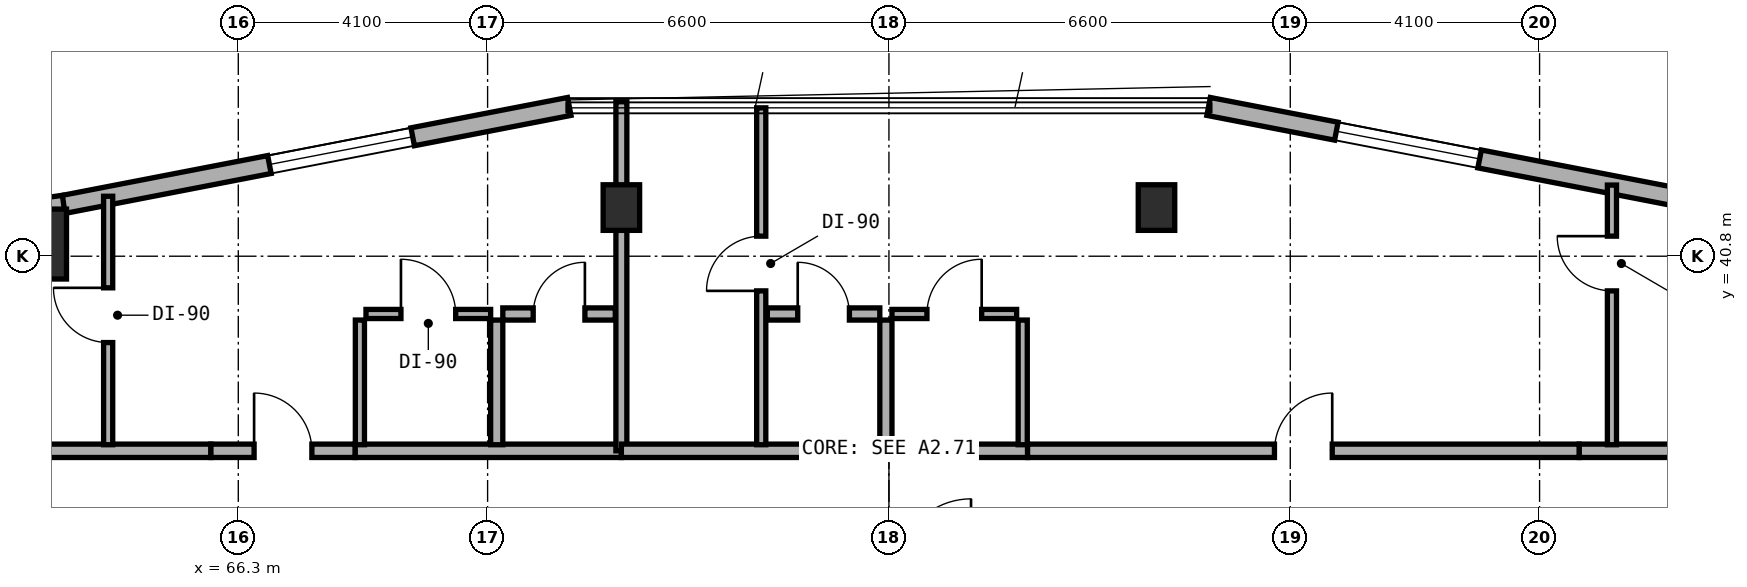
"""IFC4 building model, lengths in metres.
Left out: names, types, materials, properties, quantities, classifications, styles, units other than length and angle.
Written with IfcOpenShell. Run it as: python <this file> out.ifc"""

import sys

from ifc_helpers import new_model, si_unit, direction, frame, frame_2d, origin, origin_2d, place, context, subcontext, project, spatial, rectangle, extrude, element, fill, save


model = new_model("IFC4")
c1 = context("Model", 3, precision=1e-05, world=origin(), true_north=direction((0.0, 1.0)))
c2 = subcontext(c1, "Body", "Model", "MODEL_VIEW")
j1 = project(units=[si_unit("LENGTHUNIT", "METRE"), si_unit("PLANEANGLEUNIT", "RADIAN")], contexts=[c1])
p1 = place(None, origin())
s1 = spatial("IfcSite", under=j1, at=p1, CompositionType="ELEMENT")
p2 = place(p1, origin())
s2 = spatial("IfcBuilding", under=s1, at=p2, CompositionType="ELEMENT")
p3 = place(p2, frame((0.0, 0.0, 83.5)))
s3 = spatial("IfcBuildingStorey", under=s2, at=p3, CompositionType="ELEMENT", Elevation=83.5)
for number, where, z_axis, x_axis in (
    (1, (72.6, 41.6, 0.0), (0.0, 0.0, 1.0), (1.0, 0.0, 0.0)),
    (2, (81.4, 41.6, 0.0), (0.0, 0.0, 1.0), (1.0, 0.0, 0.0)),
):
    element("IfcColumn", number, at=place(p3, frame(where, z_axis=z_axis, x_axis=x_axis)), inside=s3, PredefinedType="COLUMN", context=c2, shape_type="SweptSolid", body=[
        extrude(rectangle(XDim=0.6, YDim=0.75, at=origin_2d()), origin(), (0.0, 0.0, 1.0), 3.5),
    ])
p4 = place(p3, frame((63.0, 41.0, 0.0), z_axis=(0.0, 0.0, 1.0), x_axis=(1.0, 0.0, 0.0)))
e3 = element("IfcColumn", 3, at=p4, inside=s3, PredefinedType="COLUMN", context=c2, shape_type="SweptSolid", body=[
    extrude(rectangle(XDim=0.95, YDim=1.15, at=origin_2d()), origin(), (0.0, 0.0, 1.0), 3.5),
])
p5 = place(p3, frame((90.579, 41.651, 0.0), z_axis=(0.0, 0.0, 1.0), x_axis=(-0.981750199588, 0.190175039396, 0.0)))
e4 = element("IfcWall", 4, at=p5, inside=s3, PredefinedType="STANDARD", context=c2, shape_type="SweptSolid", body=[
    extrude(rectangle(XDim=8.477, YDim=0.3, at=frame_2d((4.238, 0.0))), origin(), (0.0, 0.0, 1.0), 3.25),
])
p6 = place(p5, frame((3.937, 0.0, 0.8)))
e5 = element("IfcOpeningElement", 5, at=p6, cuts=e4, PredefinedType="OPENING", context=c2, shape_type="SweptSolid", body=[
    extrude(rectangle(XDim=2.4, YDim=1.6, at=frame_2d((1.2, 0.8))), frame((0.0, 0.16, 0.0), z_axis=(0.0, -1.0, 0.0), x_axis=(1.0, 0.0, 0.0)), (0.0, 0.0, 1.0), 0.32),
])
p7 = place(p3, frame((71.743, 43.263, 0.0), z_axis=(0.0, 0.0, 1.0), x_axis=(-0.981750199588, -0.190175039396, 0.0)))
e6 = element("IfcWall", 6, at=p7, inside=s3, PredefinedType="STANDARD", context=c2, shape_type="SweptSolid", body=[
    extrude(rectangle(XDim=8.477, YDim=0.3, at=frame_2d((4.238, 0.0))), origin(), (0.0, 0.0, 1.0), 3.25),
])
p8 = place(p7, frame((2.623, 0.0, 0.8)))
e7 = element("IfcOpeningElement", 7, at=p8, cuts=e6, PredefinedType="OPENING", context=c2, shape_type="SweptSolid", body=[
    extrude(rectangle(XDim=2.4, YDim=1.6, at=frame_2d((1.2, 0.8))), frame((0.0, 0.16, 0.0), z_axis=(0.0, -1.0, 0.0), x_axis=(1.0, 0.0, 0.0)), (0.0, 0.0, 1.0), 0.32),
])
p9 = place(p3, frame((63.428, 41.652, 0.0), z_axis=(0.0, 0.0, 1.0), x_axis=(-0.991293937098, -0.131667498923, 0.0)))
e8 = element("IfcWall", 8, at=p9, inside=s3, PredefinedType="STANDARD", context=c2, shape_type="SweptSolid", body=[
    extrude(rectangle(XDim=0.677, YDim=0.3, at=frame_2d((0.338, 0.0))), origin(), (0.0, 0.0, 1.0), 3.25),
])
p10 = place(p3, frame((59.36, 37.6, 0.0), z_axis=(0.0, 0.0, 1.0), x_axis=(1.0, 0.0, 0.0)))
e9 = element("IfcWall", 9, at=p10, inside=s3, PredefinedType="SOLIDWALL", context=c2, shape_type="SweptSolid", body=[
    extrude(rectangle(XDim=6.49, YDim=0.22, at=frame_2d((3.245, 0.0))), origin(), (0.0, 0.0, 1.0), 2.945),
])
p11 = place(p3, frame((68.22, 37.6, 0.0), z_axis=(0.0, 0.0, 1.0), x_axis=(1.0, 0.0, 0.0)))
e10 = element("IfcWall", 10, at=p11, inside=s3, PredefinedType="SOLIDWALL", context=c2, shape_type="SweptSolid", body=[
    extrude(rectangle(XDim=4.38, YDim=0.22, at=frame_2d((2.19, 0.0))), origin(), (0.0, 0.0, 1.0), 2.825),
])
p12 = place(p3, frame((65.85, 37.6, 0.0), z_axis=(0.0, 0.0, 1.0), x_axis=(1.0, 0.0, 0.0)))
e11 = element("IfcWall", 11, at=p12, inside=s3, PredefinedType="SOLIDWALL", context=c2, shape_type="SweptSolid", body=[
    extrude(rectangle(XDim=2.37, YDim=0.22, at=frame_2d((1.185, 0.0))), origin(), (0.0, 0.0, 1.0), 3.22),
])
p13 = place(p12, frame((0.71, 0.0, 0.0)))
e12 = element("IfcOpeningElement", 12, at=p13, cuts=e11, PredefinedType="OPENING", context=c2, shape_type="SweptSolid", body=[
    extrude(rectangle(XDim=0.95, YDim=2.1, at=frame_2d((0.475, 1.05))), frame((0.0, 0.12, 0.0), z_axis=(0.0, -1.0, 0.0), x_axis=(1.0, 0.0, 0.0)), (0.0, 0.0, 1.0), 0.24),
])
p14 = place(p3, frame((64.16, 37.7, 0.0), z_axis=(0.0, 0.0, 1.0), x_axis=(0.0, 1.0, 0.0)))
e13 = element("IfcWall", 13, at=p14, inside=s3, PredefinedType="PARTITIONING", context=c2, shape_type="SweptSolid", body=[
    extrude(rectangle(XDim=4.086, YDim=0.15, at=frame_2d((2.043, 0.0))), origin(), (0.0, 0.0, 1.0), 2.945),
])
p15 = place(p14, frame((1.68, 0.0, 0.0)))
e14 = element("IfcOpeningElement", 14, at=p15, cuts=e13, PredefinedType="OPENING", context=c2, shape_type="SweptSolid", body=[
    extrude(rectangle(XDim=0.9, YDim=2.1, at=frame_2d((0.45, 1.05))), frame((0.0, 0.085, 0.0), z_axis=(0.0, -1.0, 0.0), x_axis=(1.0, 0.0, 0.0)), (0.0, 0.0, 1.0), 0.17),
])
p16 = place(p3, frame((70.55, 37.7, 0.0), z_axis=(0.0, 0.0, 1.0), x_axis=(0.0, 1.0, 0.0)))
e15 = element("IfcWall", 15, at=p16, inside=s3, PredefinedType="PLUMBINGWALL", context=c2, shape_type="SweptSolid", body=[
    extrude(rectangle(XDim=2.05, YDim=0.2, at=frame_2d((1.025, 0.0))), origin(), (0.0, 0.0, 1.0), 3.22),
])
p17 = place(p3, frame((68.3, 37.7, 0.0), z_axis=(0.0, 0.0, 1.0), x_axis=(0.0, 1.0, 0.0)))
e16 = element("IfcWall", 16, at=p17, inside=s3, PredefinedType="PARTITIONING", context=c2, shape_type="SweptSolid", body=[
    extrude(rectangle(XDim=2.05, YDim=0.15, at=frame_2d((1.025, 0.0))), origin(), (0.0, 0.0, 1.0), 3.22),
])
p18 = place(p3, frame((70.65, 39.85, 0.0), z_axis=(0.0, 0.0, 1.0), x_axis=(1.0, 0.0, 0.0)))
e17 = element("IfcWall", 17, at=p18, inside=s3, PredefinedType="PLUMBINGWALL", context=c2, shape_type="SweptSolid", body=[
    extrude(rectangle(XDim=1.85, YDim=0.2, at=frame_2d((0.925, 0.0))), origin(), (0.0, 0.0, 1.0), 3.22),
])
p19 = place(p18, frame((0.5, 0.0, 0.0)))
e18 = element("IfcOpeningElement", 18, at=p19, cuts=e17, PredefinedType="OPENING", context=c2, shape_type="SweptSolid", body=[
    extrude(rectangle(XDim=0.85, YDim=2.1, at=frame_2d((0.425, 1.05))), frame((0.0, 0.11, 0.0), z_axis=(0.0, -1.0, 0.0), x_axis=(1.0, 0.0, 0.0)), (0.0, 0.0, 1.0), 0.22),
])
p20 = place(p3, frame((68.4, 39.85, 0.0), z_axis=(0.0, 0.0, 1.0), x_axis=(1.0, 0.0, 0.0)))
e19 = element("IfcWall", 19, at=p20, inside=s3, PredefinedType="PARTITIONING", context=c2, shape_type="SweptSolid", body=[
    extrude(rectangle(XDim=2.05, YDim=0.15, at=frame_2d((1.025, 0.0))), origin(), (0.0, 0.0, 1.0), 3.22),
])
p21 = place(p20, frame((0.575, 0.0, 0.0)))
e20 = element("IfcOpeningElement", 20, at=p21, cuts=e19, PredefinedType="OPENING", context=c2, shape_type="SweptSolid", body=[
    extrude(rectangle(XDim=0.9, YDim=2.1, at=frame_2d((0.45, 1.05))), frame((0.0, 0.085, 0.0), z_axis=(0.0, -1.0, 0.0), x_axis=(1.0, 0.0, 0.0)), (0.0, 0.0, 1.0), 0.17),
])
p22 = place(p3, frame((72.6, 37.6, 0.0), z_axis=(0.0, 0.0, 1.0), x_axis=(0.0, 1.0, 0.0)))
e21 = element("IfcWall", 21, at=p22, inside=s3, PredefinedType="SOLIDWALL", context=c2, shape_type="SweptSolid", body=[
    extrude(rectangle(XDim=5.74, YDim=0.18, at=frame_2d((2.87, 0.0))), origin(), (0.0, 0.0, 1.0), 2.825),
])
p23 = place(p3, frame((72.6, 37.6, 0.0), z_axis=(0.0, 0.0, 1.0), x_axis=(1.0, 0.0, 0.0)))
e22 = element("IfcWall", 22, at=p23, inside=s3, PredefinedType="SOLIDWALL", context=c2, shape_type="SweptSolid", body=[
    extrude(rectangle(XDim=6.68, YDim=0.22, at=frame_2d((3.34, 0.0))), origin(), (0.0, 0.0, 1.0), 2.825),
])
p24 = place(p3, frame((88.35, 37.6, 0.0), z_axis=(0.0, 0.0, 1.0), x_axis=(1.0, 0.0, 0.0)))
e23 = element("IfcWall", 23, at=p24, inside=s3, PredefinedType="SOLIDWALL", context=c2, shape_type="SweptSolid", body=[
    extrude(rectangle(XDim=6.29, YDim=0.22, at=frame_2d((3.145, 0.0))), origin(), (0.0, 0.0, 1.0), 2.945),
])
p25 = place(p3, frame((79.28, 37.6, 0.0), z_axis=(0.0, 0.0, 1.0), x_axis=(1.0, 0.0, 0.0)))
e24 = element("IfcWall", 24, at=p25, inside=s3, PredefinedType="SOLIDWALL", context=c2, shape_type="SweptSolid", body=[
    extrude(rectangle(XDim=9.07, YDim=0.22, at=frame_2d((4.535, 0.0))), origin(), (0.0, 0.0, 1.0), 2.825),
])
p26 = place(p25, frame((4.06, 0.0, 0.0)))
e25 = element("IfcOpeningElement", 25, at=p26, cuts=e24, PredefinedType="OPENING", context=c2, shape_type="SweptSolid", body=[
    extrude(rectangle(XDim=0.95, YDim=2.1, at=frame_2d((0.475, 1.05))), frame((0.0, 0.12, 0.0), z_axis=(0.0, -1.0, 0.0), x_axis=(1.0, 0.0, 0.0)), (0.0, 0.0, 1.0), 0.24),
])
p27 = place(p3, frame((74.9, 37.7, 0.0), z_axis=(0.0, 0.0, 1.0), x_axis=(0.0, 1.0, 0.0)))
e26 = element("IfcWall", 26, at=p27, inside=s3, PredefinedType="PARTITIONING", context=c2, shape_type="SweptSolid", body=[
    extrude(rectangle(XDim=5.54, YDim=0.15, at=frame_2d((2.77, 0.0))), origin(), (0.0, 0.0, 1.0), 2.865),
])
p28 = place(p27, frame((2.53, 0.0, 0.0)))
e27 = element("IfcOpeningElement", 27, at=p28, cuts=e26, PredefinedType="OPENING", context=c2, shape_type="SweptSolid", body=[
    extrude(rectangle(XDim=0.9, YDim=2.1, at=frame_2d((0.45, 1.05))), frame((0.0, 0.085, 0.0), z_axis=(0.0, -1.0, 0.0), x_axis=(1.0, 0.0, 0.0)), (0.0, 0.0, 1.0), 0.17),
])
p29 = place(p3, frame((88.89, 37.7, 0.0), z_axis=(0.0, 0.0, 1.0), x_axis=(0.0, 1.0, 0.0)))
e28 = element("IfcWall", 28, at=p29, inside=s3, PredefinedType="PARTITIONING", context=c2, shape_type="SweptSolid", body=[
    extrude(rectangle(XDim=4.27, YDim=0.15, at=frame_2d((2.135, 0.0))), origin(), (0.0, 0.0, 1.0), 2.945),
])
p30 = place(p29, frame((2.53, 0.0, 0.0)))
e29 = element("IfcOpeningElement", 29, at=p30, cuts=e28, PredefinedType="OPENING", context=c2, shape_type="SweptSolid", body=[
    extrude(rectangle(XDim=0.9, YDim=2.1, at=frame_2d((0.45, 1.05))), frame((0.0, 0.085, 0.0), z_axis=(0.0, -1.0, 0.0), x_axis=(1.0, 0.0, 0.0)), (0.0, 0.0, 1.0), 0.17),
])
p31 = place(p3, frame((76.95, 37.7, 0.0), z_axis=(0.0, 0.0, 1.0), x_axis=(0.0, 1.0, 0.0)))
e30 = element("IfcWall", 30, at=p31, inside=s3, PredefinedType="PLUMBINGWALL", context=c2, shape_type="SweptSolid", body=[
    extrude(rectangle(XDim=2.05, YDim=0.2, at=frame_2d((1.025, 0.0))), origin(), (0.0, 0.0, 1.0), 2.865),
])
p32 = place(p3, frame((79.2, 37.7, 0.0), z_axis=(0.0, 0.0, 1.0), x_axis=(0.0, 1.0, 0.0)))
e31 = element("IfcWall", 31, at=p32, inside=s3, PredefinedType="PARTITIONING", context=c2, shape_type="SweptSolid", body=[
    extrude(rectangle(XDim=2.05, YDim=0.15, at=frame_2d((1.025, 0.0))), origin(), (0.0, 0.0, 1.0), 2.865),
])
p33 = place(p3, frame((75.0, 39.85, 0.0), z_axis=(0.0, 0.0, 1.0), x_axis=(1.0, 0.0, 0.0)))
e32 = element("IfcWall", 32, at=p33, inside=s3, PredefinedType="PLUMBINGWALL", context=c2, shape_type="SweptSolid", body=[
    extrude(rectangle(XDim=1.85, YDim=0.2, at=frame_2d((0.925, 0.0))), origin(), (0.0, 0.0, 1.0), 3.22),
])
p34 = place(p33, frame((0.5, 0.0, 0.0)))
e33 = element("IfcOpeningElement", 33, at=p34, cuts=e32, PredefinedType="OPENING", context=c2, shape_type="SweptSolid", body=[
    extrude(rectangle(XDim=0.85, YDim=2.1, at=frame_2d((0.425, 1.05))), frame((0.0, 0.11, 0.0), z_axis=(0.0, -1.0, 0.0), x_axis=(1.0, 0.0, 0.0)), (0.0, 0.0, 1.0), 0.22),
])
p35 = place(p3, frame((77.05, 39.85, 0.0), z_axis=(0.0, 0.0, 1.0), x_axis=(1.0, 0.0, 0.0)))
e34 = element("IfcWall", 34, at=p35, inside=s3, PredefinedType="PARTITIONING", context=c2, shape_type="SweptSolid", body=[
    extrude(rectangle(XDim=2.05, YDim=0.15, at=frame_2d((1.025, 0.0))), origin(), (0.0, 0.0, 1.0), 3.22),
])
p36 = place(p35, frame((0.575, 0.0, 0.0)))
e35 = element("IfcOpeningElement", 35, at=p36, cuts=e34, PredefinedType="OPENING", context=c2, shape_type="SweptSolid", body=[
    extrude(rectangle(XDim=0.9, YDim=2.1, at=frame_2d((0.45, 1.05))), frame((0.0, 0.085, 0.0), z_axis=(0.0, -1.0, 0.0), x_axis=(1.0, 0.0, 0.0)), (0.0, 0.0, 1.0), 0.17),
])
p37 = place(p6, origin())
e36 = element("IfcWindow", 36, at=p37, inside=s3, PartitioningType="SINGLE_PANEL", PredefinedType="WINDOW", context=c2, shape_type="SweptSolid", body=[
    extrude(rectangle(XDim=2.4, YDim=1.6, at=frame_2d((1.2, 0.8))), frame((0.0, 0.03, 0.0), z_axis=(0.0, -1.0, 0.0), x_axis=(1.0, 0.0, 0.0)), (0.0, 0.0, 1.0), 0.06),
])
fill(e5, e36)
p38 = place(p8, origin())
e37 = element("IfcWindow", 37, at=p38, inside=s3, PartitioningType="SINGLE_PANEL", PredefinedType="WINDOW", context=c2, shape_type="SweptSolid", body=[
    extrude(rectangle(XDim=2.4, YDim=1.6, at=frame_2d((1.2, 0.8))), frame((0.0, 0.03, 0.0), z_axis=(0.0, -1.0, 0.0), x_axis=(1.0, 0.0, 0.0)), (0.0, 0.0, 1.0), 0.06),
])
fill(e7, e37)
p39 = place(p13, origin())
e38 = element("IfcDoor", 38, at=p39, inside=s3, OperationType="SINGLE_SWING_LEFT", PredefinedType="DOOR", context=c2, shape_type="SweptSolid", body=[
    extrude(rectangle(XDim=0.95, YDim=2.1, at=frame_2d((0.475, 1.05))), frame((0.0, 0.025, 0.0), z_axis=(0.0, -1.0, 0.0), x_axis=(1.0, 0.0, 0.0)), (0.0, 0.0, 1.0), 0.05),
])
fill(e12, e38)
p40 = place(p15, origin())
e39 = element("IfcDoor", 39, at=p40, inside=s3, OperationType="SINGLE_SWING_RIGHT", PredefinedType="DOOR", context=c2, shape_type="SweptSolid", body=[
    extrude(rectangle(XDim=0.9, YDim=2.1, at=frame_2d((0.45, 1.05))), frame((0.0, 0.025, 0.0), z_axis=(0.0, -1.0, 0.0), x_axis=(1.0, 0.0, 0.0)), (0.0, 0.0, 1.0), 0.05),
])
fill(e14, e39)
p41 = place(p19, origin())
e40 = element("IfcDoor", 40, at=p41, inside=s3, OperationType="SINGLE_SWING_RIGHT", PredefinedType="DOOR", context=c2, shape_type="SweptSolid", body=[
    extrude(rectangle(XDim=0.85, YDim=2.1, at=frame_2d((0.425, 1.05))), frame((0.0, 0.025, 0.0), z_axis=(0.0, -1.0, 0.0), x_axis=(1.0, 0.0, 0.0)), (0.0, 0.0, 1.0), 0.05),
])
fill(e18, e40)
p42 = place(p21, origin())
e41 = element("IfcDoor", 41, at=p42, inside=s3, OperationType="SINGLE_SWING_LEFT", PredefinedType="DOOR", context=c2, shape_type="SweptSolid", body=[
    extrude(rectangle(XDim=0.9, YDim=2.1, at=frame_2d((0.45, 1.05))), frame((0.0, 0.025, 0.0), z_axis=(0.0, -1.0, 0.0), x_axis=(1.0, 0.0, 0.0)), (0.0, 0.0, 1.0), 0.05),
])
fill(e20, e41)
p43 = place(p26, origin())
e42 = element("IfcDoor", 42, at=p43, inside=s3, OperationType="SINGLE_SWING_RIGHT", PredefinedType="DOOR", context=c2, shape_type="SweptSolid", body=[
    extrude(rectangle(XDim=0.95, YDim=2.1, at=frame_2d((0.475, 1.05))), frame((0.0, 0.025, 0.0), z_axis=(0.0, -1.0, 0.0), x_axis=(1.0, 0.0, 0.0)), (0.0, 0.0, 1.0), 0.05),
])
fill(e25, e42)
p44 = place(p28, origin())
e43 = element("IfcDoor", 43, at=p44, inside=s3, OperationType="SINGLE_SWING_LEFT", PredefinedType="DOOR", context=c2, shape_type="SweptSolid", body=[
    extrude(rectangle(XDim=0.9, YDim=2.1, at=frame_2d((0.45, 1.05))), frame((0.0, 0.025, 0.0), z_axis=(0.0, -1.0, 0.0), x_axis=(1.0, 0.0, 0.0)), (0.0, 0.0, 1.0), 0.05),
])
fill(e27, e43)
p45 = place(p30, origin())
e44 = element("IfcDoor", 44, at=p45, inside=s3, OperationType="SINGLE_SWING_RIGHT", PredefinedType="DOOR", context=c2, shape_type="SweptSolid", body=[
    extrude(rectangle(XDim=0.9, YDim=2.1, at=frame_2d((0.45, 1.05))), frame((0.0, 0.025, 0.0), z_axis=(0.0, -1.0, 0.0), x_axis=(1.0, 0.0, 0.0)), (0.0, 0.0, 1.0), 0.05),
])
fill(e29, e44)
p46 = place(p34, origin())
e45 = element("IfcDoor", 45, at=p46, inside=s3, OperationType="SINGLE_SWING_LEFT", PredefinedType="DOOR", context=c2, shape_type="SweptSolid", body=[
    extrude(rectangle(XDim=0.85, YDim=2.1, at=frame_2d((0.425, 1.05))), frame((0.0, 0.025, 0.0), z_axis=(0.0, -1.0, 0.0), x_axis=(1.0, 0.0, 0.0)), (0.0, 0.0, 1.0), 0.05),
])
fill(e33, e45)
p47 = place(p36, origin())
e46 = element("IfcDoor", 46, at=p47, inside=s3, OperationType="SINGLE_SWING_RIGHT", PredefinedType="DOOR", context=c2, shape_type="SweptSolid", body=[
    extrude(rectangle(XDim=0.9, YDim=2.1, at=frame_2d((0.45, 1.05))), frame((0.0, 0.025, 0.0), z_axis=(0.0, -1.0, 0.0), x_axis=(1.0, 0.0, 0.0)), (0.0, 0.0, 1.0), 0.05),
])
fill(e35, e46)
save(model, sys.argv[1])
